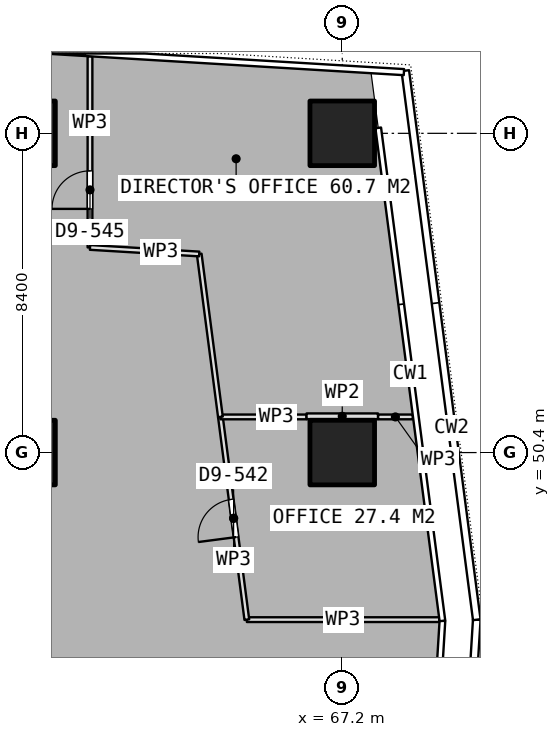
"""IFC4 building model, lengths in metres.
Left out: names, types, materials, properties, quantities, classifications, styles, units other than length and angle.
Written with IfcOpenShell. Run it as: python <this file> out.ifc"""

import sys

from ifc_helpers import new_model, si_unit, direction, frame, frame_2d, origin, origin_2d, place, context, subcontext, project, spatial, rectangle, extrude, element, fill, save


model = new_model("IFC4")
c1 = context("Model", 3, precision=1e-05, world=origin(), true_north=direction((0.0, 1.0)))
c2 = subcontext(c1, "Body", "Model", "MODEL_VIEW")
j1 = project(units=[si_unit("LENGTHUNIT", "METRE"), si_unit("PLANEANGLEUNIT", "RADIAN")], contexts=[c1])
p1 = place(None, origin())
s1 = spatial("IfcSite", under=j1, at=p1, CompositionType="ELEMENT")
p2 = place(p1, origin())
s2 = spatial("IfcBuilding", under=s1, at=p2, CompositionType="ELEMENT")
p3 = place(p2, frame((0.0, 0.0, 136.55)))
s3 = spatial("IfcBuildingStorey", under=s2, at=p3, CompositionType="ELEMENT", Elevation=136.55)
for number, where, z_axis, x_axis in (
    (1, (58.8, 50.4, 0.0), (0.0, 0.0, 1.0), (1.0, 0.0, 0.0)),
    (2, (58.8, 58.8, 0.0), (0.0, 0.0, 1.0), (1.0, 0.0, 0.0)),
    (3, (67.2, 50.4, 0.0), (0.0, 0.0, 1.0), (1.0, 0.0, 0.0)),
    (4, (67.2, 58.8, 0.0), (0.0, 0.0, 1.0), (1.0, 0.0, 0.0)),
):
    element("IfcColumn", number, at=place(p3, frame(where, z_axis=z_axis, x_axis=x_axis)), inside=s3, PredefinedType="COLUMN", context=c2, shape_type="SweptSolid", body=[
        extrude(rectangle(XDim=1.7, YDim=1.7, at=origin_2d()), origin(), (0.0, 0.0, 1.0), 3.75),
    ])
p4 = place(p3, frame((69.751, 46.004, 0.0), z_axis=(0.0, 0.0, 1.0), x_axis=(-1.0, 0.0, 0.0)))
e5 = element("IfcWall", 5, at=p4, inside=s3, PredefinedType="PARTITIONING", context=c2, shape_type="SweptSolid", body=[
    extrude(rectangle(XDim=5.062, YDim=0.125, at=frame_2d((2.531, 0.0))), origin(), (0.0, 0.0, 1.0), 3.5),
])
p5 = place(p3, frame((64.689, 46.004, 0.0), z_axis=(0.0, 0.0, 1.0), x_axis=(-0.129216941745, 0.991616348174, 0.0)))
e6 = element("IfcWall", 6, at=p5, inside=s3, PredefinedType="PARTITIONING", context=c2, shape_type="SweptSolid", body=[
    extrude(rectangle(XDim=5.379, YDim=0.125, at=frame_2d((2.689, 0.0))), origin(), (0.0, 0.0, 1.0), 3.5),
])
p6 = place(p5, frame((2.19, 0.0, 0.0)))
e7 = element("IfcOpeningElement", 7, at=p6, cuts=e6, PredefinedType="OPENING", context=c2, shape_type="SweptSolid", body=[
    extrude(rectangle(XDim=1.0, YDim=2.1, at=frame_2d((0.5, 1.05))), frame((0.0, 0.073, 0.0), z_axis=(0.0, -1.0, 0.0), x_axis=(1.0, 0.0, 0.0)), (0.0, 0.0, 1.0), 0.145),
])
p7 = place(p3, frame((63.994, 51.338, 0.0), z_axis=(0.0, 0.0, 1.0), x_axis=(1.0, 0.0, 0.0)))
e8 = element("IfcWall", 8, at=p7, inside=s3, PredefinedType="PARTITIONING", context=c2, shape_type="SweptSolid", body=[
    extrude(rectangle(XDim=2.266, YDim=0.125, at=frame_2d((1.133, 0.0))), origin(), (0.0, 0.0, 1.0), 3.5),
])
p8 = place(p3, frame((68.14, 51.338, 0.0), z_axis=(0.0, 0.0, 1.0), x_axis=(1.0, 0.0, 0.0)))
e9 = element("IfcWall", 9, at=p8, inside=s3, PredefinedType="PARTITIONING", context=c2, shape_type="SweptSolid", body=[
    extrude(rectangle(XDim=0.917, YDim=0.125, at=frame_2d((0.458, 0.0))), origin(), (0.0, 0.0, 1.0), 3.5),
])
p9 = place(p3, frame((60.562, 55.798, 0.0), z_axis=(0.0, 0.0, 1.0), x_axis=(0.0, 1.0, 0.0)))
e10 = element("IfcWall", 10, at=p9, inside=s3, PredefinedType="PARTITIONING", context=c2, shape_type="SweptSolid", body=[
    extrude(rectangle(XDim=5.029, YDim=0.125, at=frame_2d((2.514, 0.0))), origin(), (0.0, 0.0, 1.0), 3.5),
])
p10 = place(p9, frame((1.014, 0.0, 0.0)))
e11 = element("IfcOpeningElement", 11, at=p10, cuts=e10, PredefinedType="OPENING", context=c2, shape_type="SweptSolid", body=[
    extrude(rectangle(XDim=1.0, YDim=2.1, at=frame_2d((0.5, 1.05))), frame((0.0, 0.073, 0.0), z_axis=(0.0, -1.0, 0.0), x_axis=(1.0, 0.0, 0.0)), (0.0, 0.0, 1.0), 0.145),
])
p11 = place(p3, frame((63.994, 51.339, 0.0), z_axis=(0.0, 0.0, 1.0), x_axis=(-0.129073541997, 0.991635023966, 0.0)))
e12 = element("IfcWall", 12, at=p11, inside=s3, PredefinedType="PARTITIONING", context=c2, shape_type="SweptSolid", body=[
    extrude(rectangle(XDim=4.322, YDim=0.125, at=frame_2d((2.161, 0.0))), origin(), (0.0, 0.0, 1.0), 3.5),
])
p12 = place(p3, frame((63.436, 55.625, 0.0), z_axis=(0.0, 0.0, 1.0), x_axis=(-0.998191233869, 0.060118721102, 0.0)))
e13 = element("IfcWall", 13, at=p12, inside=s3, PredefinedType="PARTITIONING", context=c2, shape_type="SweptSolid", body=[
    extrude(rectangle(XDim=2.879, YDim=0.125, at=frame_2d((1.439, 0.0))), origin(), (0.0, 0.0, 1.0), 3.5),
])
p13 = place(p3, frame((66.26, 51.355, 0.0), z_axis=(0.0, 0.0, 1.0), x_axis=(1.0, 0.0, 0.0)))
e14 = element("IfcWall", 14, at=p13, inside=s3, PredefinedType="PARTITIONING", context=c2, shape_type="SweptSolid", body=[
    extrude(rectangle(XDim=1.88, YDim=0.15, at=frame_2d((0.94, 0.0))), origin(), (0.0, 0.0, 1.0), 3.5),
])
p14 = place(p6, origin())
e15 = element("IfcDoor", 15, at=p14, inside=s3, OperationType="SINGLE_SWING_LEFT", PredefinedType="DOOR", context=c2, shape_type="SweptSolid", body=[
    extrude(rectangle(XDim=1.0, YDim=2.1, at=frame_2d((0.5, 1.05))), frame((0.0, 0.025, 0.0), z_axis=(0.0, -1.0, 0.0), x_axis=(1.0, 0.0, 0.0)), (0.0, 0.0, 1.0), 0.05),
])
fill(e7, e15)
p15 = place(p10, origin())
e16 = element("IfcDoor", 16, at=p15, inside=s3, OperationType="SINGLE_SWING_LEFT", PredefinedType="DOOR", context=c2, shape_type="SweptSolid", body=[
    extrude(rectangle(XDim=1.0, YDim=2.1, at=frame_2d((0.5, 1.05))), frame((0.0, 0.025, 0.0), z_axis=(0.0, -1.0, 0.0), x_axis=(1.0, 0.0, 0.0)), (0.0, 0.0, 1.0), 0.05),
])
fill(e11, e16)
save(model, sys.argv[1])
